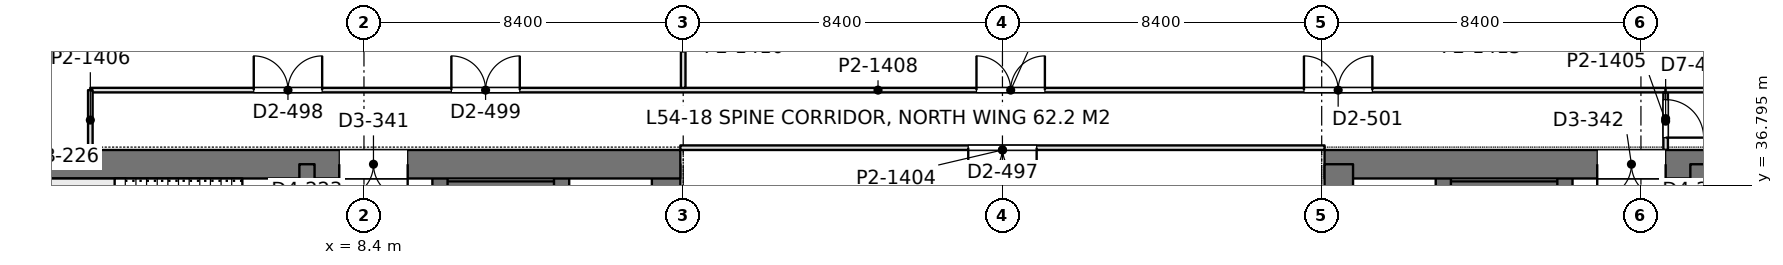
"""IFC4 building model, lengths in metres.
Left out: names, types, materials, properties, quantities, classifications, styles, units other than length and angle.
Written with IfcOpenShell. Run it as: python <this file> out.ifc"""

import sys

from ifc_helpers import new_model, si_unit, direction, frame, frame_2d, origin, place, context, subcontext, project, spatial, rectangle, extrude, element, fill, save


model = new_model("IFC4")
c1 = context("Model", 3, precision=1e-05, world=origin(), true_north=direction((0.0, 1.0)))
c2 = subcontext(c1, "Body", "Model", "MODEL_VIEW")
j1 = project(units=[si_unit("LENGTHUNIT", "METRE"), si_unit("PLANEANGLEUNIT", "RADIAN")], contexts=[c1])
p1 = place(None, origin())
s1 = spatial("IfcSite", under=j1, at=p1, CompositionType="ELEMENT")
p2 = place(p1, origin())
s2 = spatial("IfcBuilding", under=s1, at=p2, CompositionType="ELEMENT")
p3 = place(p2, frame((0.0, 0.0, 236.4)))
s3 = spatial("IfcBuildingStorey", under=s2, at=p3, CompositionType="ELEMENT", Elevation=236.4)
p4 = place(p3, frame((-1.125, 37.35, 0.0), z_axis=(0.0, 0.0, 1.0), x_axis=(1.0, 0.0, 0.0)))
e1 = element("IfcWall", 1, at=p4, inside=s3, PredefinedType="SHEAR", context=c2, shape_type="SweptSolid", body=[
    extrude(rectangle(XDim=17.85, YDim=0.75, at=frame_2d((8.925, 0.0))), origin(), (0.0, 0.0, 1.0), 4.2),
])
p5 = place(p4, frame((8.875, 0.0, 0.0)))
e2 = element("IfcOpeningElement", 2, at=p5, cuts=e1, PredefinedType="OPENING", context=c2, shape_type="SweptSolid", body=[
    extrude(rectangle(XDim=1.8, YDim=2.4, at=frame_2d((0.9, 1.2))), frame((0.0, 0.385, 0.0), z_axis=(0.0, -1.0, 0.0), x_axis=(1.0, 0.0, 0.0)), (0.0, 0.0, 1.0), 0.77),
])
p6 = place(p3, frame((16.35, 27.8, 0.0), z_axis=(0.0, 0.0, 1.0), x_axis=(0.0, 1.0, 0.0)))
e3 = element("IfcWall", 3, at=p6, inside=s3, PredefinedType="SHEAR", context=c2, shape_type="SweptSolid", body=[
    extrude(rectangle(XDim=9.55, YDim=0.75, at=frame_2d((4.775, 0.0))), origin(), (0.0, 0.0, 1.0), 4.2),
])
p7 = place(p3, frame((6.9, 13.05, 0.0), z_axis=(0.0, 0.0, 1.0), x_axis=(0.0, 1.0, 0.0)))
e4 = element("IfcWall", 4, at=p7, inside=s3, PredefinedType="SHEAR", context=c2, shape_type="SweptSolid", body=[
    extrude(rectangle(XDim=24.3, YDim=0.4, at=frame_2d((12.15, 0.0))), origin(), (0.0, 0.0, 1.0), 4.2),
])
p8 = place(p7, frame((1.3, 0.0, 0.0)))
e5 = element("IfcOpeningElement", 5, at=p8, cuts=e4, PredefinedType="OPENING", context=c2, shape_type="SweptSolid", body=[
    extrude(rectangle(XDim=1.0, YDim=2.2, at=frame_2d((0.5, 1.1))), frame((0.0, 0.21, 0.0), z_axis=(0.0, -1.0, 0.0), x_axis=(1.0, 0.0, 0.0)), (0.0, 0.0, 1.0), 0.42),
])
p9 = place(p7, frame((22.0, 0.0, 0.0)))
e6 = element("IfcOpeningElement", 6, at=p9, cuts=e4, PredefinedType="OPENING", context=c2, shape_type="SweptSolid", body=[
    extrude(rectangle(XDim=1.0, YDim=2.2, at=frame_2d((0.5, 1.1))), frame((0.0, 0.21, 0.0), z_axis=(0.0, -1.0, 0.0), x_axis=(1.0, 0.0, 0.0)), (0.0, 0.0, 1.0), 0.42),
])
p10 = place(p7, frame((5.55, 0.0, 0.0)))
e7 = element("IfcOpeningElement", 7, at=p10, cuts=e4, PredefinedType="OPENING", context=c2, shape_type="SweptSolid", body=[
    extrude(rectangle(XDim=1.0, YDim=2.2, at=frame_2d((0.5, 1.1))), frame((0.0, 0.21, 0.0), z_axis=(0.0, -1.0, 0.0), x_axis=(1.0, 0.0, 0.0)), (0.0, 0.0, 1.0), 0.42),
])
p11 = place(p7, frame((9.55, 0.0, 0.0)))
e8 = element("IfcOpeningElement", 8, at=p11, cuts=e4, PredefinedType="OPENING", context=c2, shape_type="SweptSolid", body=[
    extrude(rectangle(XDim=1.0, YDim=2.2, at=frame_2d((0.5, 1.1))), frame((0.0, 0.21, 0.0), z_axis=(0.0, -1.0, 0.0), x_axis=(1.0, 0.0, 0.0)), (0.0, 0.0, 1.0), 0.42),
])
p12 = place(p7, frame((12.8, 0.0, 0.0)))
e9 = element("IfcOpeningElement", 9, at=p12, cuts=e4, PredefinedType="OPENING", context=c2, shape_type="SweptSolid", body=[
    extrude(rectangle(XDim=1.1, YDim=2.2, at=frame_2d((0.55, 1.1))), frame((0.0, 0.21, 0.0), z_axis=(0.0, -1.0, 0.0), x_axis=(1.0, 0.0, 0.0)), (0.0, 0.0, 1.0), 0.42),
])
p13 = place(p7, frame((15.538, 0.0, 0.0)))
e10 = element("IfcOpeningElement", 10, at=p13, cuts=e4, PredefinedType="OPENING", context=c2, shape_type="SweptSolid", body=[
    extrude(rectangle(XDim=1.1, YDim=2.2, at=frame_2d((0.55, 1.1))), frame((0.0, 0.21, 0.0), z_axis=(0.0, -1.0, 0.0), x_axis=(1.0, 0.0, 0.0)), (0.0, 0.0, 1.0), 0.42),
])
p14 = place(p7, frame((18.262, 0.0, 0.0)))
e11 = element("IfcOpeningElement", 11, at=p14, cuts=e4, PredefinedType="OPENING", context=c2, shape_type="SweptSolid", body=[
    extrude(rectangle(XDim=1.1, YDim=2.2, at=frame_2d((0.55, 1.1))), frame((0.0, 0.21, 0.0), z_axis=(0.0, -1.0, 0.0), x_axis=(1.0, 0.0, 0.0)), (0.0, 0.0, 1.0), 0.42),
])
p15 = place(p3, frame((10.4, 13.05, 0.0), z_axis=(0.0, 0.0, 1.0), x_axis=(0.0, 1.0, 0.0)))
e12 = element("IfcWall", 12, at=p15, inside=s3, PredefinedType="SHEAR", context=c2, shape_type="SweptSolid", body=[
    extrude(rectangle(XDim=24.3, YDim=0.4, at=frame_2d((12.15, 0.0))), origin(), (0.0, 0.0, 1.0), 4.2),
])
p16 = place(p15, frame((15.75, 0.0, 0.0)))
e13 = element("IfcOpeningElement", 13, at=p16, cuts=e12, PredefinedType="OPENING", context=c2, shape_type="SweptSolid", body=[
    extrude(rectangle(XDim=1.1, YDim=2.2, at=frame_2d((0.55, 1.1))), frame((0.0, 0.21, 0.0), z_axis=(0.0, -1.0, 0.0), x_axis=(1.0, 0.0, 0.0)), (0.0, 0.0, 1.0), 0.42),
])
p17 = place(p15, frame((18.6, 0.0, 0.0)))
e14 = element("IfcOpeningElement", 14, at=p17, cuts=e12, PredefinedType="OPENING", context=c2, shape_type="SweptSolid", body=[
    extrude(rectangle(XDim=1.1, YDim=2.2, at=frame_2d((0.55, 1.1))), frame((0.0, 0.21, 0.0), z_axis=(0.0, -1.0, 0.0), x_axis=(1.0, 0.0, 0.0)), (0.0, 0.0, 1.0), 0.42),
])
p18 = place(p15, frame((21.45, 0.0, 0.0)))
e15 = element("IfcOpeningElement", 15, at=p18, cuts=e12, PredefinedType="OPENING", context=c2, shape_type="SweptSolid", body=[
    extrude(rectangle(XDim=1.1, YDim=2.2, at=frame_2d((0.55, 1.1))), frame((0.0, 0.21, 0.0), z_axis=(0.0, -1.0, 0.0), x_axis=(1.0, 0.0, 0.0)), (0.0, 0.0, 1.0), 0.42),
])
p19 = place(p15, frame((6.05, 0.0, 0.0)))
e16 = element("IfcOpeningElement", 16, at=p19, cuts=e12, PredefinedType="OPENING", context=c2, shape_type="SweptSolid", body=[
    extrude(rectangle(XDim=1.8, YDim=2.4, at=frame_2d((0.9, 1.2))), frame((0.0, 0.21, 0.0), z_axis=(0.0, -1.0, 0.0), x_axis=(1.0, 0.0, 0.0)), (0.0, 0.0, 1.0), 0.42),
])
p20 = place(p15, frame((11.25, 0.0, 0.0)))
e17 = element("IfcOpeningElement", 17, at=p20, cuts=e12, PredefinedType="OPENING", context=c2, shape_type="SweptSolid", body=[
    extrude(rectangle(XDim=1.8, YDim=2.4, at=frame_2d((0.9, 1.2))), frame((0.0, 0.21, 0.0), z_axis=(0.0, -1.0, 0.0), x_axis=(1.0, 0.0, 0.0)), (0.0, 0.0, 1.0), 0.42),
])
p21 = place(p3, frame((13.6, 27.925, 0.0), z_axis=(0.0, 0.0, 1.0), x_axis=(0.0, 1.0, 0.0)))
e18 = element("IfcWall", 18, at=p21, inside=s3, PredefinedType="SHEAR", context=c2, shape_type="SweptSolid", body=[
    extrude(rectangle(XDim=9.425, YDim=0.4, at=frame_2d((4.712, 0.0))), origin(), (0.0, 0.0, 1.0), 4.2),
])
p22 = place(p3, frame((10.4, 36.625, 0.0), z_axis=(0.0, 0.0, 1.0), x_axis=(1.0, 0.0, 0.0)))
e19 = element("IfcWall", 19, at=p22, inside=s3, PredefinedType="SHEAR", context=c2, shape_type="SweptSolid", body=[
    extrude(rectangle(XDim=3.2, YDim=0.55, at=frame_2d((1.6, 0.0))), origin(), (0.0, 0.0, 1.0), 4.2),
])
p23 = place(p3, frame((33.675, 37.35, 0.0), z_axis=(0.0, 0.0, 1.0), x_axis=(1.0, 0.0, 0.0)))
e20 = element("IfcWall", 20, at=p23, inside=s3, PredefinedType="SHEAR", context=c2, shape_type="SweptSolid", body=[
    extrude(rectangle(XDim=17.85, YDim=0.75, at=frame_2d((8.925, 0.0))), origin(), (0.0, 0.0, 1.0), 4.2),
])
p24 = place(p23, frame((7.175, 0.0, 0.0)))
e21 = element("IfcOpeningElement", 21, at=p24, cuts=e20, PredefinedType="OPENING", context=c2, shape_type="SweptSolid", body=[
    extrude(rectangle(XDim=1.8, YDim=2.4, at=frame_2d((0.9, 1.2))), frame((0.0, 0.385, 0.0), z_axis=(0.0, -1.0, 0.0), x_axis=(1.0, 0.0, 0.0)), (0.0, 0.0, 1.0), 0.77),
])
p25 = place(p3, frame((34.05, 27.8, 0.0), z_axis=(0.0, 0.0, 1.0), x_axis=(0.0, 1.0, 0.0)))
e22 = element("IfcWall", 22, at=p25, inside=s3, PredefinedType="SHEAR", context=c2, shape_type="SweptSolid", body=[
    extrude(rectangle(XDim=9.55, YDim=0.75, at=frame_2d((4.775, 0.0))), origin(), (0.0, 0.0, 1.0), 4.2),
])
p26 = place(p3, frame((43.5, 13.05, 0.0), z_axis=(0.0, 0.0, 1.0), x_axis=(0.0, 1.0, 0.0)))
e23 = element("IfcWall", 23, at=p26, inside=s3, PredefinedType="SHEAR", context=c2, shape_type="SweptSolid", body=[
    extrude(rectangle(XDim=24.3, YDim=0.4, at=frame_2d((12.15, 0.0))), origin(), (0.0, 0.0, 1.0), 4.2),
])
p27 = place(p26, frame((1.3, 0.0, 0.0)))
e24 = element("IfcOpeningElement", 24, at=p27, cuts=e23, PredefinedType="OPENING", context=c2, shape_type="SweptSolid", body=[
    extrude(rectangle(XDim=1.0, YDim=2.2, at=frame_2d((0.5, 1.1))), frame((0.0, 0.21, 0.0), z_axis=(0.0, -1.0, 0.0), x_axis=(1.0, 0.0, 0.0)), (0.0, 0.0, 1.0), 0.42),
])
p28 = place(p26, frame((22.0, 0.0, 0.0)))
e25 = element("IfcOpeningElement", 25, at=p28, cuts=e23, PredefinedType="OPENING", context=c2, shape_type="SweptSolid", body=[
    extrude(rectangle(XDim=1.0, YDim=2.2, at=frame_2d((0.5, 1.1))), frame((0.0, 0.21, 0.0), z_axis=(0.0, -1.0, 0.0), x_axis=(1.0, 0.0, 0.0)), (0.0, 0.0, 1.0), 0.42),
])
p29 = place(p26, frame((5.55, 0.0, 0.0)))
e26 = element("IfcOpeningElement", 26, at=p29, cuts=e23, PredefinedType="OPENING", context=c2, shape_type="SweptSolid", body=[
    extrude(rectangle(XDim=1.0, YDim=2.2, at=frame_2d((0.5, 1.1))), frame((0.0, 0.21, 0.0), z_axis=(0.0, -1.0, 0.0), x_axis=(1.0, 0.0, 0.0)), (0.0, 0.0, 1.0), 0.42),
])
p30 = place(p26, frame((9.55, 0.0, 0.0)))
e27 = element("IfcOpeningElement", 27, at=p30, cuts=e23, PredefinedType="OPENING", context=c2, shape_type="SweptSolid", body=[
    extrude(rectangle(XDim=1.0, YDim=2.2, at=frame_2d((0.5, 1.1))), frame((0.0, 0.21, 0.0), z_axis=(0.0, -1.0, 0.0), x_axis=(1.0, 0.0, 0.0)), (0.0, 0.0, 1.0), 0.42),
])
p31 = place(p26, frame((12.8, 0.0, 0.0)))
e28 = element("IfcOpeningElement", 28, at=p31, cuts=e23, PredefinedType="OPENING", context=c2, shape_type="SweptSolid", body=[
    extrude(rectangle(XDim=1.1, YDim=2.2, at=frame_2d((0.55, 1.1))), frame((0.0, 0.21, 0.0), z_axis=(0.0, -1.0, 0.0), x_axis=(1.0, 0.0, 0.0)), (0.0, 0.0, 1.0), 0.42),
])
p32 = place(p26, frame((15.538, 0.0, 0.0)))
e29 = element("IfcOpeningElement", 29, at=p32, cuts=e23, PredefinedType="OPENING", context=c2, shape_type="SweptSolid", body=[
    extrude(rectangle(XDim=1.1, YDim=2.2, at=frame_2d((0.55, 1.1))), frame((0.0, 0.21, 0.0), z_axis=(0.0, -1.0, 0.0), x_axis=(1.0, 0.0, 0.0)), (0.0, 0.0, 1.0), 0.42),
])
p33 = place(p26, frame((18.262, 0.0, 0.0)))
e30 = element("IfcOpeningElement", 30, at=p33, cuts=e23, PredefinedType="OPENING", context=c2, shape_type="SweptSolid", body=[
    extrude(rectangle(XDim=1.1, YDim=2.2, at=frame_2d((0.55, 1.1))), frame((0.0, 0.21, 0.0), z_axis=(0.0, -1.0, 0.0), x_axis=(1.0, 0.0, 0.0)), (0.0, 0.0, 1.0), 0.42),
])
p34 = place(p3, frame((40.0, 13.05, 0.0), z_axis=(0.0, 0.0, 1.0), x_axis=(0.0, 1.0, 0.0)))
e31 = element("IfcWall", 31, at=p34, inside=s3, PredefinedType="SHEAR", context=c2, shape_type="SweptSolid", body=[
    extrude(rectangle(XDim=24.3, YDim=0.4, at=frame_2d((12.15, 0.0))), origin(), (0.0, 0.0, 1.0), 4.2),
])
p35 = place(p34, frame((15.75, 0.0, 0.0)))
e32 = element("IfcOpeningElement", 32, at=p35, cuts=e31, PredefinedType="OPENING", context=c2, shape_type="SweptSolid", body=[
    extrude(rectangle(XDim=1.1, YDim=2.2, at=frame_2d((0.55, 1.1))), frame((0.0, 0.21, 0.0), z_axis=(0.0, -1.0, 0.0), x_axis=(1.0, 0.0, 0.0)), (0.0, 0.0, 1.0), 0.42),
])
p36 = place(p34, frame((18.6, 0.0, 0.0)))
e33 = element("IfcOpeningElement", 33, at=p36, cuts=e31, PredefinedType="OPENING", context=c2, shape_type="SweptSolid", body=[
    extrude(rectangle(XDim=1.1, YDim=2.2, at=frame_2d((0.55, 1.1))), frame((0.0, 0.21, 0.0), z_axis=(0.0, -1.0, 0.0), x_axis=(1.0, 0.0, 0.0)), (0.0, 0.0, 1.0), 0.42),
])
p37 = place(p34, frame((21.45, 0.0, 0.0)))
e34 = element("IfcOpeningElement", 34, at=p37, cuts=e31, PredefinedType="OPENING", context=c2, shape_type="SweptSolid", body=[
    extrude(rectangle(XDim=1.1, YDim=2.2, at=frame_2d((0.55, 1.1))), frame((0.0, 0.21, 0.0), z_axis=(0.0, -1.0, 0.0), x_axis=(1.0, 0.0, 0.0)), (0.0, 0.0, 1.0), 0.42),
])
p38 = place(p34, frame((6.05, 0.0, 0.0)))
e35 = element("IfcOpeningElement", 35, at=p38, cuts=e31, PredefinedType="OPENING", context=c2, shape_type="SweptSolid", body=[
    extrude(rectangle(XDim=1.8, YDim=2.4, at=frame_2d((0.9, 1.2))), frame((0.0, 0.21, 0.0), z_axis=(0.0, -1.0, 0.0), x_axis=(1.0, 0.0, 0.0)), (0.0, 0.0, 1.0), 0.42),
])
p39 = place(p34, frame((11.25, 0.0, 0.0)))
e36 = element("IfcOpeningElement", 36, at=p39, cuts=e31, PredefinedType="OPENING", context=c2, shape_type="SweptSolid", body=[
    extrude(rectangle(XDim=1.8, YDim=2.4, at=frame_2d((0.9, 1.2))), frame((0.0, 0.21, 0.0), z_axis=(0.0, -1.0, 0.0), x_axis=(1.0, 0.0, 0.0)), (0.0, 0.0, 1.0), 0.42),
])
p40 = place(p3, frame((36.8, 27.925, 0.0), z_axis=(0.0, 0.0, 1.0), x_axis=(0.0, 1.0, 0.0)))
e37 = element("IfcWall", 37, at=p40, inside=s3, PredefinedType="SHEAR", context=c2, shape_type="SweptSolid", body=[
    extrude(rectangle(XDim=9.425, YDim=0.4, at=frame_2d((4.712, 0.0))), origin(), (0.0, 0.0, 1.0), 4.2),
])
p41 = place(p3, frame((40.0, 36.625, 0.0), z_axis=(0.0, 0.0, 1.0), x_axis=(-1.0, 0.0, 0.0)))
e38 = element("IfcWall", 38, at=p41, inside=s3, PredefinedType="SHEAR", context=c2, shape_type="SweptSolid", body=[
    extrude(rectangle(XDim=3.2, YDim=0.55, at=frame_2d((1.6, 0.0))), origin(), (0.0, 0.0, 1.0), 4.2),
])
p42 = place(p3, frame((16.8, 39.358, 0.0), z_axis=(0.0, 0.0, 1.0), x_axis=(0.0, 1.0, 0.0)))
e39 = element("IfcWall", 39, at=p42, inside=s3, PredefinedType="PARTITIONING", context=c2, shape_type="SweptSolid", body=[
    extrude(rectangle(XDim=2.093, YDim=0.12, at=frame_2d((1.046, 0.0))), origin(), (0.0, 0.0, 1.0), 3.69),
])
p43 = place(p3, frame((1.2, 39.3, 0.0), z_axis=(0.0, 0.0, 1.0), x_axis=(1.0, 0.0, 0.0)))
e40 = element("IfcWall", 40, at=p43, inside=s3, PredefinedType="PARTITIONING", context=c2, shape_type="SweptSolid", body=[
    extrude(rectangle(XDim=41.452, YDim=0.12, at=frame_2d((20.726, 0.0))), origin(), (0.0, 0.0, 1.0), 3.55),
])
p44 = place(p43, frame((4.3, 0.0, 0.0)))
e41 = element("IfcOpeningElement", 41, at=p44, cuts=e40, PredefinedType="OPENING", context=c2, shape_type="SweptSolid", body=[
    extrude(rectangle(XDim=1.8, YDim=2.2, at=frame_2d((0.9, 1.1))), frame((0.0, 0.07, 0.0), z_axis=(0.0, -1.0, 0.0), x_axis=(1.0, 0.0, 0.0)), (0.0, 0.0, 1.0), 0.14),
])
p45 = place(p43, frame((9.5, 0.0, 0.0)))
e42 = element("IfcOpeningElement", 42, at=p45, cuts=e40, PredefinedType="OPENING", context=c2, shape_type="SweptSolid", body=[
    extrude(rectangle(XDim=1.8, YDim=2.2, at=frame_2d((0.9, 1.1))), frame((0.0, 0.07, 0.0), z_axis=(0.0, -1.0, 0.0), x_axis=(1.0, 0.0, 0.0)), (0.0, 0.0, 1.0), 0.14),
])
p46 = place(p43, frame((23.317, 0.0, 0.0)))
e43 = element("IfcOpeningElement", 43, at=p46, cuts=e40, PredefinedType="OPENING", context=c2, shape_type="SweptSolid", body=[
    extrude(rectangle(XDim=1.8, YDim=2.2, at=frame_2d((0.9, 1.1))), frame((0.0, 0.07, 0.0), z_axis=(0.0, -1.0, 0.0), x_axis=(1.0, 0.0, 0.0)), (0.0, 0.0, 1.0), 0.14),
])
p47 = place(p43, frame((31.933, 0.0, 0.0)))
e44 = element("IfcOpeningElement", 44, at=p47, cuts=e40, PredefinedType="OPENING", context=c2, shape_type="SweptSolid", body=[
    extrude(rectangle(XDim=1.8, YDim=2.2, at=frame_2d((0.9, 1.1))), frame((0.0, 0.07, 0.0), z_axis=(0.0, -1.0, 0.0), x_axis=(1.0, 0.0, 0.0)), (0.0, 0.0, 1.0), 0.14),
])
p48 = place(p3, frame((1.2, 37.724, 0.0), z_axis=(0.0, 0.0, 1.0), x_axis=(0.0, 1.0, 0.0)))
e45 = element("IfcWall", 45, at=p48, inside=s3, PredefinedType="PARTITIONING", context=c2, shape_type="SweptSolid", body=[
    extrude(rectangle(XDim=1.576, YDim=0.12, at=frame_2d((0.788, 0.0))), origin(), (0.0, 0.0, 1.0), 4.05),
])
p49 = place(p3, frame((42.65, 37.724, 0.0), z_axis=(0.0, 0.0, 1.0), x_axis=(0.0, 1.0, 0.0)))
e46 = element("IfcWall", 46, at=p49, inside=s3, PredefinedType="PARTITIONING", context=c2, shape_type="SweptSolid", body=[
    extrude(rectangle(XDim=1.518, YDim=0.12, at=frame_2d((0.759, 0.0))), origin(), (0.0, 0.0, 1.0), 4.05),
])
p50 = place(p49, frame((0.326, 0.0, 0.0)))
e47 = element("IfcOpeningElement", 47, at=p50, cuts=e46, PredefinedType="OPENING", context=c2, shape_type="SweptSolid", body=[
    extrude(rectangle(XDim=1.0, YDim=2.4, at=frame_2d((0.5, 1.2))), frame((0.0, 0.07, 0.0), z_axis=(0.0, -1.0, 0.0), x_axis=(1.0, 0.0, 0.0)), (0.0, 0.0, 1.0), 0.14),
])
p51 = place(p3, frame((42.648, 39.3, 0.0), z_axis=(0.0, 0.0, 1.0), x_axis=(1.0, 0.0, 0.0)))
e48 = element("IfcWall", 48, at=p51, inside=s3, PredefinedType="PARTITIONING", context=c2, shape_type="SweptSolid", body=[
    extrude(rectangle(XDim=6.552, YDim=0.12, at=frame_2d((3.276, 0.0))), origin(), (0.0, 0.0, 1.0), 3.69),
])
p52 = place(p3, frame((16.725, 37.785, 0.0), z_axis=(0.0, 0.0, 1.0), x_axis=(1.0, 0.0, 0.0)))
e49 = element("IfcWall", 49, at=p52, inside=s3, PredefinedType="PARTITIONING", context=c2, shape_type="SweptSolid", body=[
    extrude(rectangle(XDim=16.95, YDim=0.12, at=frame_2d((8.475, 0.0))), origin(), (0.0, 0.0, 1.0), 3.55),
])
p53 = place(p52, frame((7.575, 0.0, 0.0)))
e50 = element("IfcOpeningElement", 50, at=p53, cuts=e49, PredefinedType="OPENING", context=c2, shape_type="SweptSolid", body=[
    extrude(rectangle(XDim=1.8, YDim=2.2, at=frame_2d((0.9, 1.1))), frame((0.0, 0.07, 0.0), z_axis=(0.0, -1.0, 0.0), x_axis=(1.0, 0.0, 0.0)), (0.0, 0.0, 1.0), 0.14),
])
p54 = place(p5, frame((1.8, 0.0, 0.0), z_axis=(0.0, 0.0, 1.0), x_axis=(-1.0, 0.0, 0.0)))
e51 = element("IfcDoor", 51, at=p54, inside=s3, OperationType="DOUBLE_DOOR_SINGLE_SWING", PredefinedType="DOOR", context=c2, shape_type="SweptSolid", body=[
    extrude(rectangle(XDim=1.8, YDim=2.4, at=frame_2d((0.9, 1.2))), frame((0.0, 0.025, 0.0), z_axis=(0.0, -1.0, 0.0), x_axis=(1.0, 0.0, 0.0)), (0.0, 0.0, 1.0), 0.05),
])
fill(e2, e51)
p55 = place(p24, frame((1.8, 0.0, 0.0), z_axis=(0.0, 0.0, 1.0), x_axis=(-1.0, 0.0, 0.0)))
e52 = element("IfcDoor", 52, at=p55, inside=s3, OperationType="DOUBLE_DOOR_SINGLE_SWING", PredefinedType="DOOR", context=c2, shape_type="SweptSolid", body=[
    extrude(rectangle(XDim=1.8, YDim=2.4, at=frame_2d((0.9, 1.2))), frame((0.0, 0.025, 0.0), z_axis=(0.0, -1.0, 0.0), x_axis=(1.0, 0.0, 0.0)), (0.0, 0.0, 1.0), 0.05),
])
fill(e21, e52)
p56 = place(p44, origin())
e53 = element("IfcDoor", 53, at=p56, inside=s3, OperationType="DOUBLE_DOOR_SINGLE_SWING", PredefinedType="DOOR", context=c2, shape_type="SweptSolid", body=[
    extrude(rectangle(XDim=1.8, YDim=2.2, at=frame_2d((0.9, 1.1))), frame((0.0, 0.025, 0.0), z_axis=(0.0, -1.0, 0.0), x_axis=(1.0, 0.0, 0.0)), (0.0, 0.0, 1.0), 0.05),
])
fill(e41, e53)
p57 = place(p45, origin())
e54 = element("IfcDoor", 54, at=p57, inside=s3, OperationType="DOUBLE_DOOR_SINGLE_SWING", PredefinedType="DOOR", context=c2, shape_type="SweptSolid", body=[
    extrude(rectangle(XDim=1.8, YDim=2.2, at=frame_2d((0.9, 1.1))), frame((0.0, 0.025, 0.0), z_axis=(0.0, -1.0, 0.0), x_axis=(1.0, 0.0, 0.0)), (0.0, 0.0, 1.0), 0.05),
])
fill(e42, e54)
p58 = place(p46, origin())
e55 = element("IfcDoor", 55, at=p58, inside=s3, OperationType="DOUBLE_DOOR_SINGLE_SWING", PredefinedType="DOOR", context=c2, shape_type="SweptSolid", body=[
    extrude(rectangle(XDim=1.8, YDim=2.2, at=frame_2d((0.9, 1.1))), frame((0.0, 0.025, 0.0), z_axis=(0.0, -1.0, 0.0), x_axis=(1.0, 0.0, 0.0)), (0.0, 0.0, 1.0), 0.05),
])
fill(e43, e55)
p59 = place(p47, origin())
e56 = element("IfcDoor", 56, at=p59, inside=s3, OperationType="DOUBLE_DOOR_SINGLE_SWING", PredefinedType="DOOR", context=c2, shape_type="SweptSolid", body=[
    extrude(rectangle(XDim=1.8, YDim=2.2, at=frame_2d((0.9, 1.1))), frame((0.0, 0.025, 0.0), z_axis=(0.0, -1.0, 0.0), x_axis=(1.0, 0.0, 0.0)), (0.0, 0.0, 1.0), 0.05),
])
fill(e44, e56)
p60 = place(p50, frame((1.0, 0.0, 0.0), z_axis=(0.0, 0.0, 1.0), x_axis=(-1.0, 0.0, 0.0)))
e57 = element("IfcDoor", 57, at=p60, inside=s3, OperationType="SINGLE_SWING_RIGHT", PredefinedType="DOOR", context=c2, shape_type="SweptSolid", body=[
    extrude(rectangle(XDim=1.0, YDim=2.4, at=frame_2d((0.5, 1.2))), frame((0.0, 0.025, 0.0), z_axis=(0.0, -1.0, 0.0), x_axis=(1.0, 0.0, 0.0)), (0.0, 0.0, 1.0), 0.05),
])
fill(e47, e57)
p61 = place(p53, frame((1.8, 0.0, 0.0), z_axis=(0.0, 0.0, 1.0), x_axis=(-1.0, 0.0, 0.0)))
e58 = element("IfcDoor", 58, at=p61, inside=s3, OperationType="DOUBLE_DOOR_SINGLE_SWING", PredefinedType="DOOR", context=c2, shape_type="SweptSolid", body=[
    extrude(rectangle(XDim=1.8, YDim=2.2, at=frame_2d((0.9, 1.1))), frame((0.0, 0.025, 0.0), z_axis=(0.0, -1.0, 0.0), x_axis=(1.0, 0.0, 0.0)), (0.0, 0.0, 1.0), 0.05),
])
fill(e50, e58)
save(model, sys.argv[1])
